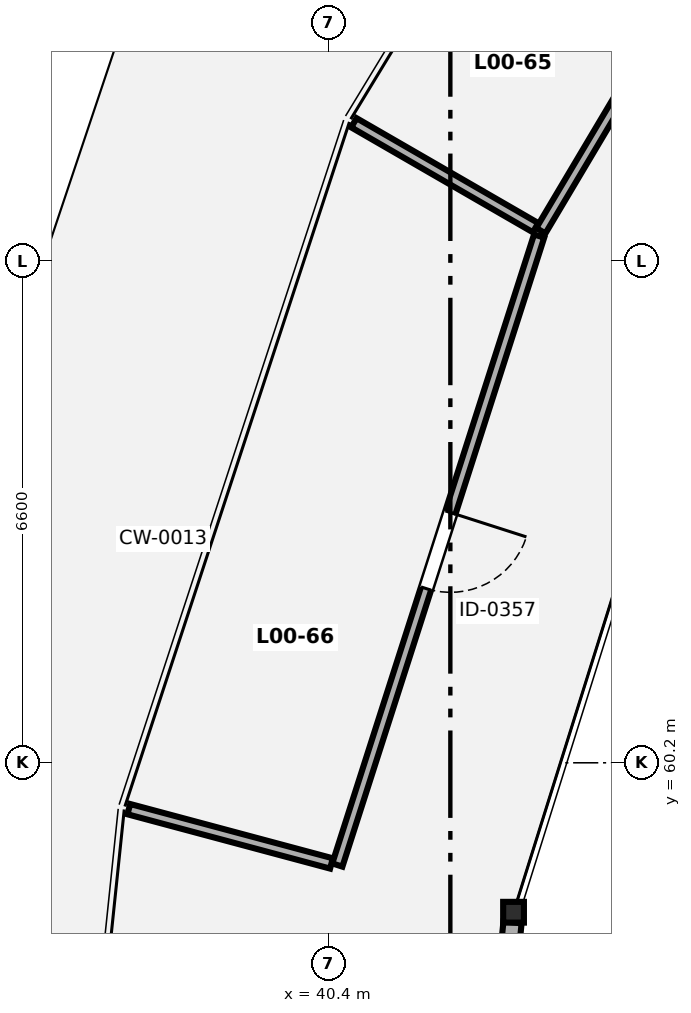
"""IFC4 building model, lengths in metres.
Left out: names, types, materials, properties, quantities, classifications, styles, units other than length and angle.
Written with IfcOpenShell. Run it as: python <this file> out.ifc"""

import sys

from ifc_helpers import new_model, si_unit, direction, frame, frame_2d, origin, origin_2d, place, context, subcontext, project, spatial, rectangle, hollow_circle, extrude, element, fill, save


model = new_model("IFC4")
c1 = context("Model", 3, precision=1e-05, world=origin(), true_north=direction((0.0, 1.0)))
c2 = subcontext(c1, "Body", "Model", "MODEL_VIEW")
j1 = project(units=[si_unit("LENGTHUNIT", "METRE"), si_unit("PLANEANGLEUNIT", "RADIAN")], contexts=[c1])
p1 = place(None, origin())
s1 = spatial("IfcSite", under=j1, at=p1, CompositionType="ELEMENT")
p2 = place(p1, origin())
s2 = spatial("IfcBuilding", under=s1, at=p2, CompositionType="ELEMENT")
p3 = place(p2, origin())
s3 = spatial("IfcBuildingStorey", under=s2, at=p3, CompositionType="ELEMENT", Elevation=0.0)
p4 = place(p3, frame((42.831, 58.234, 0.0), z_axis=(0.0, 0.0, 1.0), x_axis=(1.0, 0.0, 0.0)))
e1 = element("IfcColumn", 1, at=p4, inside=s3, PredefinedType="COLUMN", context=c2, shape_type="SweptSolid", body=[
    extrude(hollow_circle(Radius=0.136, WallThickness=0.009, at=origin_2d()), origin(), (0.0, 0.0, 1.0), 4.9),
])
p5 = place(p3, frame((42.818, 58.1, 0.0), z_axis=(0.0, 0.0, 1.0), x_axis=(-0.099291432912, -0.99505839595, 0.0)))
e2 = element("IfcWall", 2, at=p5, inside=s3, PredefinedType="SOLIDWALL", context=c2, shape_type="SweptSolid", body=[
    extrude(rectangle(XDim=8.085, YDim=0.24, at=frame_2d((4.042, 0.0))), origin(), (0.0, 0.0, 1.0), 4.35),
])
p6 = place(p5, frame((3.317, 0.0, 0.85)))
e3 = element("IfcOpeningElement", 3, at=p6, cuts=e2, PredefinedType="OPENING", context=c2, shape_type="SweptSolid", body=[
    extrude(rectangle(XDim=1.45, YDim=1.25, at=frame_2d((0.725, 0.625))), frame((0.0, 0.13, 0.0), z_axis=(0.0, -1.0, 0.0), x_axis=(1.0, 0.0, 0.0)), (0.0, 0.0, 1.0), 0.26),
])
p7 = place(p3, frame((47.448, 74.364, 0.0), z_axis=(0.0, 0.0, 1.0), x_axis=(-0.510915698067, -0.859630821614, 0.0)))
e4 = element("IfcWall", 4, at=p7, inside=s3, PredefinedType="PARTITIONING", context=c2, shape_type="SweptSolid", body=[
    extrude(rectangle(XDim=8.334, YDim=0.14, at=frame_2d((4.167, 0.0))), origin(), (0.0, 0.0, 1.0), 4.7),
])
p8 = place(p3, frame((43.121, 67.24, 0.0), z_axis=(0.0, 0.0, 1.0), x_axis=(-0.86599702495, 0.500049150362, 0.0)))
e5 = element("IfcWall", 5, at=p8, inside=s3, PredefinedType="PARTITIONING", context=c2, shape_type="SweptSolid", body=[
    extrude(rectangle(XDim=2.76, YDim=0.14, at=frame_2d((1.38, 0.0))), origin(), (0.0, 0.0, 1.0), 4.092),
])
p9 = place(p3, frame((43.168, 67.13, 0.0), z_axis=(0.0, 0.0, 1.0), x_axis=(-0.305487150125, -0.952196198852, 0.0)))
e6 = element("IfcWall", 6, at=p9, inside=s3, PredefinedType="PARTITIONING", context=c2, shape_type="SweptSolid", body=[
    extrude(rectangle(XDim=8.69, YDim=0.14, at=frame_2d((4.345, 0.0))), origin(), (0.0, 0.0, 1.0), 4.7),
])
p10 = place(p9, frame((3.82, 0.0, 0.0)))
e7 = element("IfcOpeningElement", 7, at=p10, cuts=e6, PredefinedType="OPENING", context=c2, shape_type="SweptSolid", body=[
    extrude(rectangle(XDim=1.05, YDim=2.15, at=frame_2d((0.525, 1.075))), frame((0.0, 0.08, 0.0), z_axis=(0.0, -1.0, 0.0), x_axis=(1.0, 0.0, 0.0)), (0.0, 0.0, 1.0), 0.16),
])
p11 = place(p3, frame((40.436, 58.876, 0.0), z_axis=(0.0, 0.0, 1.0), x_axis=(-0.965920014783, 0.258840732966, 0.0)))
e8 = element("IfcWall", 8, at=p11, inside=s3, PredefinedType="PARTITIONING", context=c2, shape_type="SweptSolid", body=[
    extrude(rectangle(XDim=2.76, YDim=0.14, at=frame_2d((1.38, 0.0))), origin(), (0.0, 0.0, 1.0), 4.092),
])
p12 = place(p10, origin())
e9 = element("IfcDoor", 9, at=p12, inside=s3, OperationType="SINGLE_SWING_LEFT", PredefinedType="DOOR", context=c2, shape_type="SweptSolid", body=[
    extrude(rectangle(XDim=1.05, YDim=2.15, at=frame_2d((0.525, 1.075))), frame((0.0, 0.025, 0.0), z_axis=(0.0, -1.0, 0.0), x_axis=(1.0, 0.0, 0.0)), (0.0, 0.0, 1.0), 0.05),
])
fill(e7, e9)
save(model, sys.argv[1])
